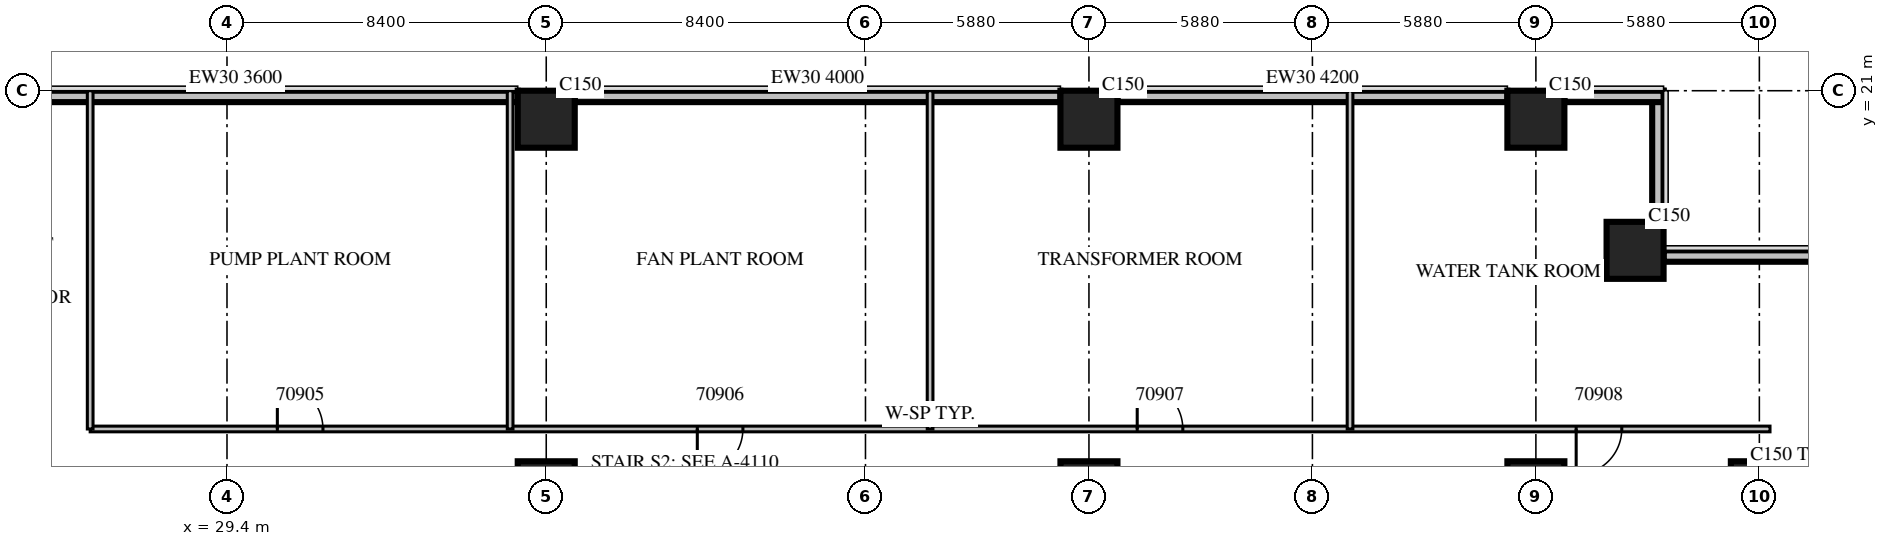
"""IFC4 building model, lengths in metres.
Left out: names, types, materials, properties, quantities, classifications, styles, units other than length and angle.
Written with IfcOpenShell. Run it as: python <this file> out.ifc"""

import sys

from ifc_helpers import new_model, si_unit, direction, frame, frame_2d, origin, origin_2d, place, context, subcontext, project, spatial, rectangle, extrude, source, transform, mapped, element, fill, save


model = new_model("IFC4")
c1 = context("Model", 3, precision=1e-05, world=origin(), true_north=direction((0.0, 1.0)))
c2 = subcontext(c1, "Body", "Model", "MODEL_VIEW")
j1 = project(units=[si_unit("LENGTHUNIT", "METRE"), si_unit("PLANEANGLEUNIT", "RADIAN")], contexts=[c1])
p1 = place(None, origin())
s1 = spatial("IfcSite", under=j1, at=p1, CompositionType="ELEMENT")
p2 = place(p1, origin())
s2 = spatial("IfcBuilding", under=s1, at=p2, CompositionType="ELEMENT")
p3 = place(p2, frame((0.0, 0.0, 34.5)))
s3 = spatial("IfcBuildingStorey", under=s2, at=p3, CompositionType="ELEMENT", Elevation=34.5)
m1 = source(origin(), c2, "Body", "SweptSolid", [
    extrude(rectangle(XDim=1.5, YDim=1.5, at=origin_2d()), origin(), (0.0, 0.0, 1.0), 6.0),
])
for number, where, z_axis, x_axis in (
    (1, (37.8, 10.5, 0.0), (0.0, 0.0, 1.0), (1.0, 0.0, 0.0)),
    (2, (37.8, 20.25, 0.0), (0.0, 0.0, 1.0), (1.0, 0.0, 0.0)),
    (3, (52.08, 10.5, 0.0), (0.0, 0.0, 1.0), (1.0, 0.0, 0.0)),
    (4, (52.08, 20.25, 0.0), (0.0, 0.0, 1.0), (1.0, 0.0, 0.0)),
    (5, (63.84, 10.5, 0.0), (0.0, 0.0, 1.0), (1.0, 0.0, 0.0)),
    (6, (63.84, 20.25, 0.0), (0.0, 0.0, 1.0), (1.0, 0.0, 0.0)),
    (7, (66.45, 16.8, 0.0), (0.0, 0.0, 1.0), (1.0, 0.0, 0.0)),
    (8, (69.72, 10.5, 0.0), (0.0, 0.0, 1.0), (1.0, 0.0, 0.0)),
):
    element("IfcColumn", number, at=place(p3, frame(where, z_axis=z_axis, x_axis=x_axis)), inside=s3, PredefinedType="COLUMN", context=c2, shape_type="MappedRepresentation", body=[
        mapped(m1, transform((0.0, 0.0, 0.0), scale=1.0)),
    ])
m2 = source(origin(), c2, "Body", "SweptSolid", [
    extrude(rectangle(XDim=4.2, YDim=0.3, at=frame_2d((2.1, 0.0))), origin(), (0.0, 0.0, 1.0), 5.6),
])
p4 = place(p3, frame((71.4, 16.65, 0.0), z_axis=(0.0, 0.0, 1.0), x_axis=(-1.0, 0.0, 0.0)))
e9 = element("IfcWall", 9, at=p4, inside=s3, PredefinedType="STANDARD", context=c2, shape_type="MappedRepresentation", body=[
    mapped(m2, transform((0.0, 0.0, 0.0), scale=1.0)),
])
m3 = source(origin(), c2, "Body", "SweptSolid", [
    extrude(rectangle(XDim=3.45, YDim=0.3, at=frame_2d((1.725, 0.0))), origin(), (0.0, 0.0, 1.0), 5.6),
])
p5 = place(p3, frame((67.05, 17.55, 0.0), z_axis=(0.0, 0.0, 1.0), x_axis=(0.0, 1.0, 0.0)))
e10 = element("IfcWall", 10, at=p5, inside=s3, PredefinedType="STANDARD", context=c2, shape_type="MappedRepresentation", body=[
    mapped(m3, transform((0.0, 0.0, 0.0), scale=1.0)),
])
m4 = source(origin(), c2, "Body", "SweptSolid", [
    extrude(rectangle(XDim=2.61, YDim=0.3, at=frame_2d((1.305, 0.0))), origin(), (0.0, 0.0, 1.0), 5.6),
])
p6 = place(p3, frame((67.2, 20.85, 0.0), z_axis=(0.0, 0.0, 1.0), x_axis=(-1.0, 0.0, 0.0)))
e11 = element("IfcWall", 11, at=p6, inside=s3, PredefinedType="STANDARD", context=c2, shape_type="MappedRepresentation", body=[
    mapped(m4, transform((0.0, 0.0, 0.0), scale=1.0)),
])
m5 = source(origin(), c2, "Body", "SweptSolid", [
    extrude(rectangle(XDim=10.26, YDim=0.3, at=frame_2d((5.13, 0.0))), origin(), (0.0, 0.0, 1.0), 4.2),
])
p7 = place(p3, frame((63.09, 20.85, 0.0), z_axis=(0.0, 0.0, 1.0), x_axis=(-1.0, 0.0, 0.0)))
e12 = element("IfcWall", 12, at=p7, inside=s3, PredefinedType="STANDARD", context=c2, shape_type="MappedRepresentation", body=[
    mapped(m5, transform((0.0, 0.0, 0.0), scale=1.0)),
])
p8 = place(p3, frame((51.33, 20.85, 0.0), z_axis=(0.0, 0.0, 1.0), x_axis=(-1.0, 0.0, 0.0)))
e13 = element("IfcWall", 13, at=p8, inside=s3, PredefinedType="STANDARD", context=c2, shape_type="SweptSolid", body=[
    extrude(rectangle(XDim=12.78, YDim=0.3, at=frame_2d((6.39, 0.0))), origin(), (0.0, 0.0, 1.0), 4.0),
])
p9 = place(p3, frame((37.05, 20.85, 0.0), z_axis=(0.0, 0.0, 1.0), x_axis=(-1.0, 0.0, 0.0)))
e14 = element("IfcWall", 14, at=p9, inside=s3, PredefinedType="STANDARD", context=c2, shape_type="SweptSolid", body=[
    extrude(rectangle(XDim=14.85, YDim=0.3, at=frame_2d((7.425, 0.0))), origin(), (0.0, 0.0, 1.0), 3.6),
])
p10 = place(p3, frame((25.8, 12.1, 0.0), z_axis=(0.0, 0.0, 1.0), x_axis=(1.0, 0.0, 0.0)))
e15 = element("IfcWall", 15, at=p10, inside=s3, PredefinedType="PARTITIONING", context=c2, shape_type="SweptSolid", body=[
    extrude(rectangle(XDim=44.2, YDim=0.15, at=frame_2d((22.1, 0.0))), origin(), (0.0, 0.0, 1.0), 5.6),
])
m6 = source(origin(), c2, "Body", "SweptSolid", [
    extrude(rectangle(XDim=1.2, YDim=2.1, at=frame_2d((0.6, 1.05))), frame((0.0, 0.085, 0.0), z_axis=(0.0, -1.0, 0.0), x_axis=(1.0, 0.0, 0.0)), (0.0, 0.0, 1.0), 0.17),
])
p11 = place(p10, frame((4.925, 0.0, 0.0)))
e16 = element("IfcOpeningElement", 16, at=p11, cuts=e15, PredefinedType="OPENING", context=c2, shape_type="MappedRepresentation", body=[
    mapped(m6, transform((0.0, 0.0, 0.0), scale=1.0)),
])
p12 = place(p10, frame((15.975, 0.0, 0.0)))
e17 = element("IfcOpeningElement", 17, at=p12, cuts=e15, PredefinedType="OPENING", context=c2, shape_type="MappedRepresentation", body=[
    mapped(m6, transform((0.0, 0.0, 0.0), scale=1.0)),
])
p13 = place(p10, frame((27.55, 0.0, 0.0)))
e18 = element("IfcOpeningElement", 18, at=p13, cuts=e15, PredefinedType="OPENING", context=c2, shape_type="MappedRepresentation", body=[
    mapped(m6, transform((0.0, 0.0, 0.0), scale=1.0)),
])
p14 = place(p10, frame((39.1, 0.0, 0.0)))
e19 = element("IfcOpeningElement", 19, at=p14, cuts=e15, PredefinedType="OPENING", context=c2, shape_type="MappedRepresentation", body=[
    mapped(m6, transform((0.0, 0.0, 0.0), scale=1.0)),
])
m7 = source(origin(), c2, "Body", "SweptSolid", [
    extrude(rectangle(XDim=8.9, YDim=0.15, at=frame_2d((4.45, 0.0))), origin(), (0.0, 0.0, 1.0), 5.6),
])
for number, where, z_axis, x_axis in (
    (20, (25.8, 12.1, 0.0), (0.0, 0.0, 1.0), (0.0, 1.0, 0.0)),
    (21, (36.85, 12.1, 0.0), (0.0, 0.0, 1.0), (0.0, 1.0, 0.0)),
    (22, (47.9, 12.1, 0.0), (0.0, 0.0, 1.0), (0.0, 1.0, 0.0)),
    (23, (58.95, 12.1, 0.0), (0.0, 0.0, 1.0), (0.0, 1.0, 0.0)),
):
    element("IfcWall", number, at=place(p3, frame(where, z_axis=z_axis, x_axis=x_axis)), inside=s3, PredefinedType="PARTITIONING", context=c2, shape_type="MappedRepresentation", body=[
        mapped(m7, transform((0.0, 0.0, 0.0), scale=1.0)),
    ])
m8 = source(origin(), c2, "Body", "SweptSolid", [
    extrude(rectangle(XDim=1.2, YDim=2.1, at=frame_2d((0.6, 1.05))), frame((0.0, 0.025, 0.0), z_axis=(0.0, -1.0, 0.0), x_axis=(1.0, 0.0, 0.0)), (0.0, 0.0, 1.0), 0.05),
])
p15 = place(p11, origin())
e24 = element("IfcDoor", 24, at=p15, inside=s3, OperationType="SINGLE_SWING_LEFT", PredefinedType="DOOR", context=c2, shape_type="MappedRepresentation", body=[
    mapped(m8, transform((0.0, 0.0, 0.0), scale=1.0)),
])
fill(e16, e24)
p16 = place(p12, origin())
e25 = element("IfcDoor", 25, at=p16, inside=s3, OperationType="SINGLE_SWING_RIGHT", PredefinedType="DOOR", context=c2, shape_type="MappedRepresentation", body=[
    mapped(m8, transform((0.0, 0.0, 0.0), scale=1.0)),
])
fill(e17, e25)
p17 = place(p13, origin())
e26 = element("IfcDoor", 26, at=p17, inside=s3, OperationType="SINGLE_SWING_LEFT", PredefinedType="DOOR", context=c2, shape_type="MappedRepresentation", body=[
    mapped(m8, transform((0.0, 0.0, 0.0), scale=1.0)),
])
fill(e18, e26)
p18 = place(p14, origin())
e27 = element("IfcDoor", 27, at=p18, inside=s3, OperationType="SINGLE_SWING_RIGHT", PredefinedType="DOOR", context=c2, shape_type="MappedRepresentation", body=[
    mapped(m8, transform((0.0, 0.0, 0.0), scale=1.0)),
])
fill(e19, e27)
save(model, sys.argv[1])
